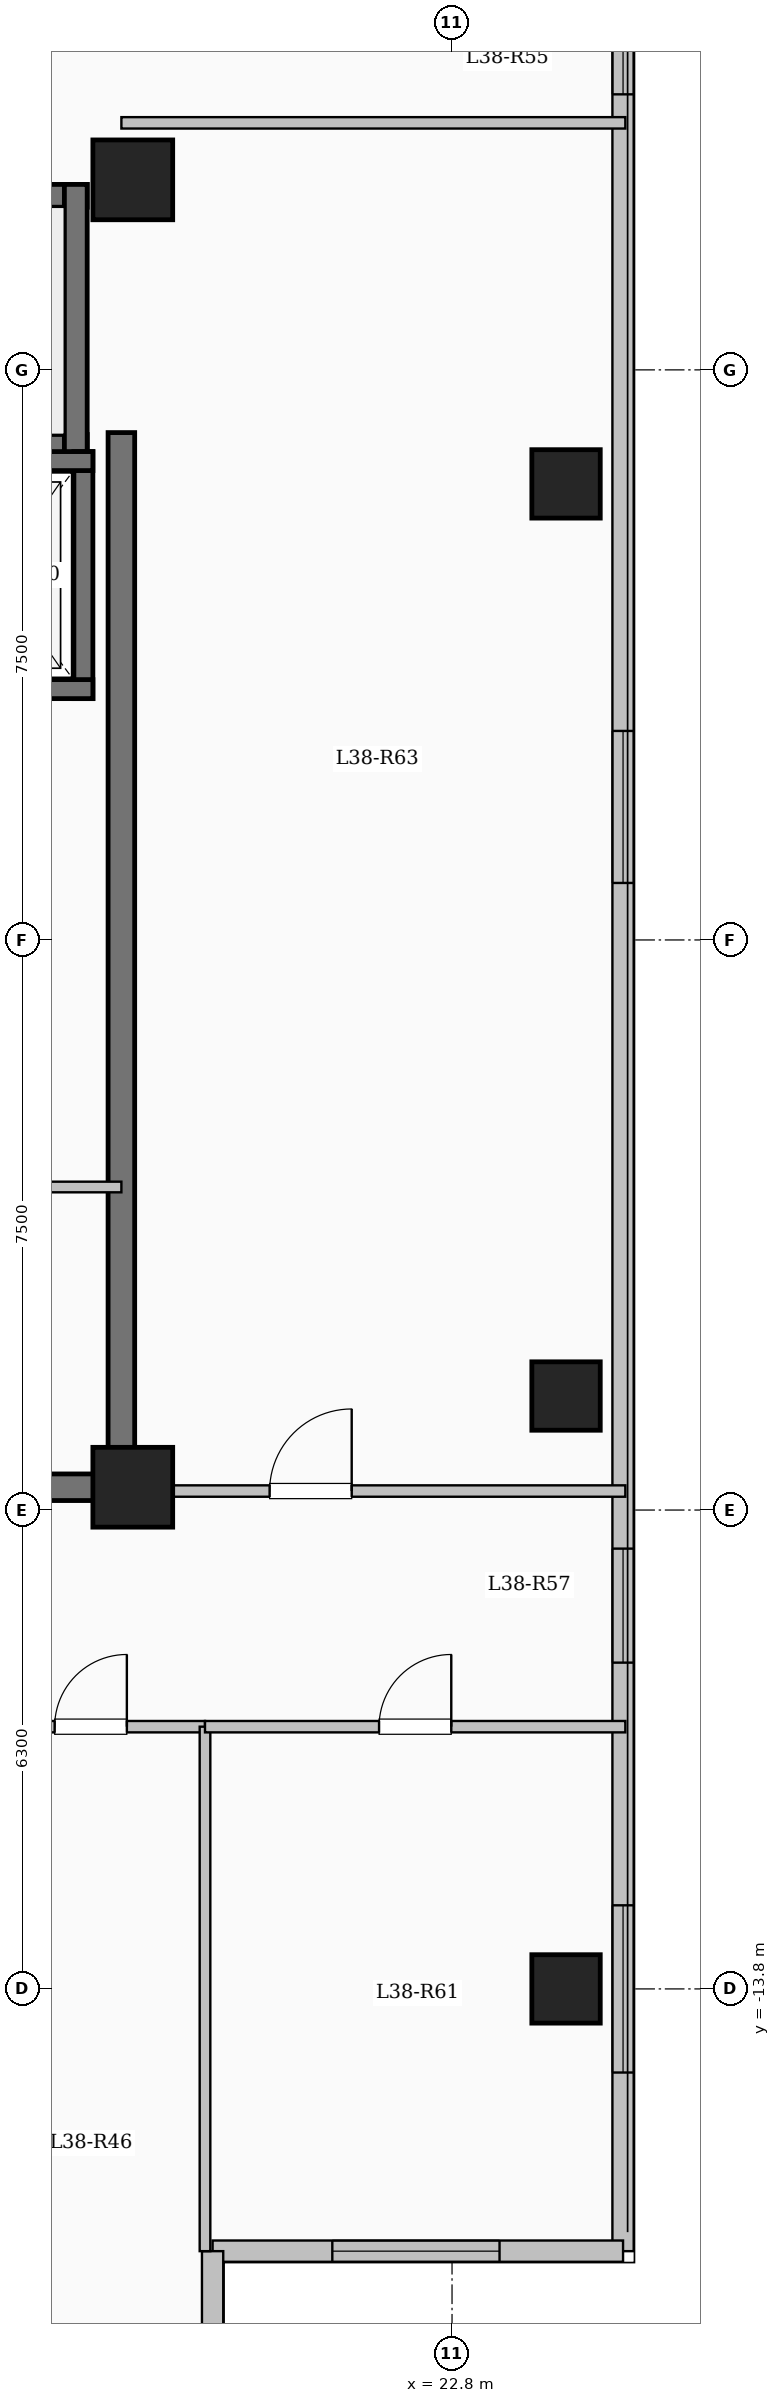
"""IFC4 building model, lengths in metres.
Left out: names, types, materials, properties, quantities, classifications, styles, units other than length and angle.
Written with IfcOpenShell. Run it as: python <this file> out.ifc"""

import sys

from ifc_helpers import new_model, si_unit, direction, frame, frame_2d, origin, origin_2d, place, context, subcontext, project, spatial, rectangle, extrude, element, fill, save


model = new_model("IFC4")
c1 = context("Model", 3, precision=1e-05, world=origin(), true_north=direction((0.0, 1.0)))
c2 = subcontext(c1, "Body", "Model", "MODEL_VIEW")
j1 = project(units=[si_unit("LENGTHUNIT", "METRE"), si_unit("PLANEANGLEUNIT", "RADIAN")], contexts=[c1])
p1 = place(None, origin())
s1 = spatial("IfcSite", under=j1, at=p1, CompositionType="ELEMENT")
p2 = place(p1, origin())
s2 = spatial("IfcBuilding", under=s1, at=p2, CompositionType="ELEMENT")
p3 = place(p2, frame((0.0, 0.0, 142.65)))
s3 = spatial("IfcBuildingStorey", under=s2, at=p3, CompositionType="ELEMENT", Elevation=142.65)
for number, where, z_axis, x_axis in (
    (1, (18.6, -7.2, 0.0), (0.0, 0.0, 1.0), (1.0, 0.0, 0.0)),
    (2, (18.6, 10.0, 0.0), (0.0, 0.0, 1.0), (1.0, 0.0, 0.0)),
):
    element("IfcColumn", number, at=place(p3, frame(where, z_axis=z_axis, x_axis=x_axis)), inside=s3, PredefinedType="COLUMN", context=c2, shape_type="SweptSolid", body=[
        extrude(rectangle(XDim=1.05, YDim=1.05, at=origin_2d()), origin(), (0.0, 0.0, 1.0), 3.35),
    ])
for number, where, z_axis, x_axis in (
    (3, (24.3, -13.8, 0.0), (0.0, 0.0, 1.0), (1.0, 0.0, 0.0)),
    (4, (24.3, -6.0, 0.0), (0.0, 0.0, 1.0), (1.0, 0.0, 0.0)),
    (5, (24.3, 6.0, 0.0), (0.0, 0.0, 1.0), (1.0, 0.0, 0.0)),
):
    element("IfcColumn", number, at=place(p3, frame(where, z_axis=z_axis, x_axis=x_axis)), inside=s3, PredefinedType="COLUMN", context=c2, shape_type="SweptSolid", body=[
        extrude(rectangle(XDim=0.9, YDim=0.9, at=origin_2d()), origin(), (0.0, 0.0, 1.0), 3.35),
    ])
p4 = place(p3, frame((25.05, 17.25, 0.0), z_axis=(0.0, 0.0, 1.0), x_axis=(0.0, -1.0, 0.0)))
e6 = element("IfcWall", 6, at=p4, inside=s3, PredefinedType="SOLIDWALL", context=c2, shape_type="SweptSolid", body=[
    extrude(rectangle(XDim=34.5, YDim=0.28, at=frame_2d((17.25, 0.0))), origin(), (0.0, 0.0, 1.0), 3.1),
])
p5 = place(p4, frame((1.375, 0.0, 0.9)))
e7 = element("IfcOpeningElement", 7, at=p5, cuts=e6, PredefinedType="OPENING", context=c2, shape_type="SweptSolid", body=[
    extrude(rectangle(XDim=2.0, YDim=1.7, at=frame_2d((1.0, 0.85))), frame((0.0, 0.15, 0.0), z_axis=(0.0, -1.0, 0.0), x_axis=(1.0, 0.0, 0.0)), (0.0, 0.0, 1.0), 0.3),
])
p6 = place(p4, frame((5.125, 0.0, 0.95)))
e8 = element("IfcOpeningElement", 8, at=p6, cuts=e6, PredefinedType="OPENING", context=c2, shape_type="SweptSolid", body=[
    extrude(rectangle(XDim=1.0, YDim=1.5, at=frame_2d((0.5, 0.75))), frame((0.0, 0.15, 0.0), z_axis=(0.0, -1.0, 0.0), x_axis=(1.0, 0.0, 0.0)), (0.0, 0.0, 1.0), 0.3),
])
p7 = place(p4, frame((14.5, 0.0, 0.9)))
e9 = element("IfcOpeningElement", 9, at=p7, cuts=e6, PredefinedType="OPENING", context=c2, shape_type="SweptSolid", body=[
    extrude(rectangle(XDim=2.0, YDim=1.7, at=frame_2d((1.0, 0.85))), frame((0.0, 0.15, 0.0), z_axis=(0.0, -1.0, 0.0), x_axis=(1.0, 0.0, 0.0)), (0.0, 0.0, 1.0), 0.3),
])
p8 = place(p4, frame((25.258, 0.0, 0.9)))
e10 = element("IfcOpeningElement", 10, at=p8, cuts=e6, PredefinedType="OPENING", context=c2, shape_type="SweptSolid", body=[
    extrude(rectangle(XDim=1.5, YDim=1.65, at=frame_2d((0.75, 0.825))), frame((0.0, 0.15, 0.0), z_axis=(0.0, -1.0, 0.0), x_axis=(1.0, 0.0, 0.0)), (0.0, 0.0, 1.0), 0.3),
])
p9 = place(p4, frame((29.95, 0.0, 0.9)))
e11 = element("IfcOpeningElement", 11, at=p9, cuts=e6, PredefinedType="OPENING", context=c2, shape_type="SweptSolid", body=[
    extrude(rectangle(XDim=2.2, YDim=1.75, at=frame_2d((1.1, 0.875))), frame((0.0, 0.15, 0.0), z_axis=(0.0, -1.0, 0.0), x_axis=(1.0, 0.0, 0.0)), (0.0, 0.0, 1.0), 0.3),
])
p10 = place(p3, frame((25.05, -17.25, 0.0), z_axis=(0.0, 0.0, 1.0), x_axis=(-1.0, 0.0, 0.0)))
e12 = element("IfcWall", 12, at=p10, inside=s3, PredefinedType="SOLIDWALL", context=c2, shape_type="SweptSolid", body=[
    extrude(rectangle(XDim=5.4, YDim=0.28, at=frame_2d((2.7, 0.0))), origin(), (0.0, 0.0, 1.0), 3.1),
])
p11 = place(p10, frame((1.625, 0.0, 0.9)))
e13 = element("IfcOpeningElement", 13, at=p11, cuts=e12, PredefinedType="OPENING", context=c2, shape_type="SweptSolid", body=[
    extrude(rectangle(XDim=2.2, YDim=1.75, at=frame_2d((1.1, 0.875))), frame((0.0, 0.15, 0.0), z_axis=(0.0, -1.0, 0.0), x_axis=(1.0, 0.0, 0.0)), (0.0, 0.0, 1.0), 0.3),
])
p12 = place(p3, frame((19.65, -17.25, 0.0), z_axis=(0.0, 0.0, 1.0), x_axis=(0.0, -1.0, 0.0)))
e14 = element("IfcWall", 14, at=p12, inside=s3, PredefinedType="SOLIDWALL", context=c2, shape_type="SweptSolid", body=[
    extrude(rectangle(XDim=3.9, YDim=0.28, at=frame_2d((1.95, 0.0))), origin(), (0.0, 0.0, 1.0), 3.1),
])
p13 = place(p12, frame((1.35, 0.0, 0.95)))
e15 = element("IfcOpeningElement", 15, at=p13, cuts=e14, PredefinedType="OPENING", context=c2, shape_type="SweptSolid", body=[
    extrude(rectangle(XDim=1.2, YDim=1.5, at=frame_2d((0.6, 0.75))), frame((0.0, 0.15, 0.0), z_axis=(0.0, -1.0, 0.0), x_axis=(1.0, 0.0, 0.0)), (0.0, 0.0, 1.0), 0.3),
])
p14 = place(p3, frame((10.0, 9.79, 0.0), z_axis=(0.0, 0.0, 1.0), x_axis=(1.0, 0.0, 0.0)))
e16 = element("IfcWall", 16, at=p14, inside=s3, PredefinedType="SHEAR", context=c2, shape_type="SweptSolid", body=[
    extrude(rectangle(XDim=8.0, YDim=0.3, at=frame_2d((4.0, 0.0))), origin(), (0.0, 0.0, 1.0), 3.35),
])
p15 = place(p3, frame((10.0, 6.5, 0.0), z_axis=(0.0, 0.0, 1.0), x_axis=(1.0, 0.0, 0.0)))
e17 = element("IfcWall", 17, at=p15, inside=s3, PredefinedType="SHEAR", context=c2, shape_type="SweptSolid", body=[
    extrude(rectangle(XDim=8.0, YDim=0.3, at=frame_2d((4.0, 0.0))), origin(), (0.0, 0.0, 1.0), 3.35),
])
p16 = place(p15, frame((0.55, 0.0, 0.0)))
e18 = element("IfcOpeningElement", 18, at=p16, cuts=e17, PredefinedType="OPENING", context=c2, shape_type="SweptSolid", body=[
    extrude(rectangle(XDim=1.0, YDim=2.15, at=frame_2d((0.5, 1.075))), frame((0.0, 0.16, 0.0), z_axis=(0.0, -1.0, 0.0), x_axis=(1.0, 0.0, 0.0)), (0.0, 0.0, 1.0), 0.32),
])
p17 = place(p3, frame((17.85, 6.35, 0.0), z_axis=(0.0, 0.0, 1.0), x_axis=(0.0, 1.0, 0.0)))
e19 = element("IfcWall", 19, at=p17, inside=s3, PredefinedType="SHEAR", context=c2, shape_type="SweptSolid", body=[
    extrude(rectangle(XDim=3.59, YDim=0.3, at=frame_2d((1.795, 0.0))), origin(), (0.0, 0.0, 1.0), 3.35),
])
p18 = place(p3, frame((17.95, 3.175, 0.0), z_axis=(0.0, 0.0, 1.0), x_axis=(0.0, 1.0, 0.0)))
e20 = element("IfcWall", 20, at=p18, inside=s3, PredefinedType="SHEAR", context=c2, shape_type="SweptSolid", body=[
    extrude(rectangle(XDim=3.25, YDim=0.25, at=frame_2d((1.625, 0.0))), origin(), (0.0, 0.0, 1.0), 3.35),
])
for number, where, z_axis, x_axis in (
    (21, (15.525, 3.3, 0.0), (0.0, 0.0, 1.0), (1.0, 0.0, 0.0)),
    (22, (15.525, 6.3, 0.0), (0.0, 0.0, 1.0), (1.0, 0.0, 0.0)),
):
    element("IfcWall", number, at=place(p3, frame(where, z_axis=z_axis, x_axis=x_axis)), inside=s3, PredefinedType="SHEAR", context=c2, shape_type="SweptSolid", body=[
        extrude(rectangle(XDim=2.55, YDim=0.25, at=frame_2d((1.275, 0.0))), origin(), (0.0, 0.0, 1.0), 3.35),
    ])
p19 = place(p3, frame((18.45, -7.375, 0.0), z_axis=(0.0, 0.0, 1.0), x_axis=(0.0, 1.0, 0.0)))
e23 = element("IfcWall", 23, at=p19, inside=s3, PredefinedType="SHEAR", context=c2, shape_type="SweptSolid", body=[
    extrude(rectangle(XDim=14.05, YDim=0.35, at=frame_2d((7.025, 0.0))), origin(), (0.0, 0.0, 1.0), 3.35),
])
p20 = place(p3, frame((10.075, -7.2, 0.0), z_axis=(0.0, 0.0, 1.0), x_axis=(1.0, 0.0, 0.0)))
e24 = element("IfcWall", 24, at=p20, inside=s3, PredefinedType="SHEAR", context=c2, shape_type="SweptSolid", body=[
    extrude(rectangle(XDim=8.55, YDim=0.35, at=frame_2d((4.275, 0.0))), origin(), (0.0, 0.0, 1.0), 3.35),
])
p21 = place(p3, frame((15.4, -3.25, 0.0), z_axis=(0.0, 0.0, 1.0), x_axis=(1.0, 0.0, 0.0)))
e25 = element("IfcWall", 25, at=p21, inside=s3, PredefinedType="PARTITIONING", context=c2, shape_type="SweptSolid", body=[
    extrude(rectangle(XDim=3.05, YDim=0.14, at=frame_2d((1.525, 0.0))), origin(), (0.0, 0.0, 1.0), 3.1),
])
p22 = place(p21, frame((1.05, 0.0, 0.0)))
e26 = element("IfcOpeningElement", 26, at=p22, cuts=e25, PredefinedType="OPENING", context=c2, shape_type="SweptSolid", body=[
    extrude(rectangle(XDim=0.9, YDim=2.08, at=frame_2d((0.45, 1.04))), frame((0.0, 0.08, 0.0), z_axis=(0.0, -1.0, 0.0), x_axis=(1.0, 0.0, 0.0)), (0.0, 0.0, 1.0), 0.16),
])
p23 = place(p3, frame((8.55, -10.35, 0.0), z_axis=(0.0, 0.0, 1.0), x_axis=(1.0, 0.0, 0.0)))
e27 = element("IfcWall", 27, at=p23, inside=s3, PredefinedType="PARTITIONING", context=c2, shape_type="SweptSolid", body=[
    extrude(rectangle(XDim=11.0, YDim=0.15, at=frame_2d((5.5, 0.0))), origin(), (0.0, 0.0, 1.0), 3.1),
])
p24 = place(p23, frame((1.516, 0.0, 0.0)))
e28 = element("IfcOpeningElement", 28, at=p24, cuts=e27, PredefinedType="OPENING", context=c2, shape_type="SweptSolid", body=[
    extrude(rectangle(XDim=0.95, YDim=2.15, at=frame_2d((0.475, 1.075))), frame((0.0, 0.085, 0.0), z_axis=(0.0, -1.0, 0.0), x_axis=(1.0, 0.0, 0.0)), (0.0, 0.0, 1.0), 0.17),
])
p25 = place(p23, frame((5.488, 0.0, 0.0)))
e29 = element("IfcOpeningElement", 29, at=p25, cuts=e27, PredefinedType="OPENING", context=c2, shape_type="SweptSolid", body=[
    extrude(rectangle(XDim=0.95, YDim=2.15, at=frame_2d((0.475, 1.075))), frame((0.0, 0.085, 0.0), z_axis=(0.0, -1.0, 0.0), x_axis=(1.0, 0.0, 0.0)), (0.0, 0.0, 1.0), 0.17),
])
p26 = place(p23, frame((9.022, 0.0, 0.0)))
e30 = element("IfcOpeningElement", 30, at=p26, cuts=e27, PredefinedType="OPENING", context=c2, shape_type="SweptSolid", body=[
    extrude(rectangle(XDim=0.95, YDim=2.15, at=frame_2d((0.475, 1.075))), frame((0.0, 0.085, 0.0), z_axis=(0.0, -1.0, 0.0), x_axis=(1.0, 0.0, 0.0)), (0.0, 0.0, 1.0), 0.17),
])
p27 = place(p3, frame((18.45, -7.25, 0.0), z_axis=(0.0, 0.0, 1.0), x_axis=(1.0, 0.0, 0.0)))
e31 = element("IfcWall", 31, at=p27, inside=s3, PredefinedType="PARTITIONING", context=c2, shape_type="SweptSolid", body=[
    extrude(rectangle(XDim=6.63, YDim=0.15, at=frame_2d((3.315, 0.0))), origin(), (0.0, 0.0, 1.0), 3.1),
])
p28 = place(p27, frame((1.95, 0.0, 0.0)))
e32 = element("IfcOpeningElement", 32, at=p28, cuts=e31, PredefinedType="OPENING", context=c2, shape_type="SweptSolid", body=[
    extrude(rectangle(XDim=1.08, YDim=2.15, at=frame_2d((0.54, 1.075))), frame((0.0, 0.085, 0.0), z_axis=(0.0, -1.0, 0.0), x_axis=(1.0, 0.0, 0.0)), (0.0, 0.0, 1.0), 0.17),
])
p29 = place(p3, frame((18.45, 10.75, 0.0), z_axis=(0.0, 0.0, 1.0), x_axis=(1.0, 0.0, 0.0)))
e33 = element("IfcWall", 33, at=p29, inside=s3, PredefinedType="PARTITIONING", context=c2, shape_type="SweptSolid", body=[
    extrude(rectangle(XDim=6.63, YDim=0.15, at=frame_2d((3.315, 0.0))), origin(), (0.0, 0.0, 1.0), 3.1),
])
p30 = place(p3, frame((19.55, -17.25, 0.0), z_axis=(0.0, 0.0, 1.0), x_axis=(0.0, 1.0, 0.0)))
e34 = element("IfcWall", 34, at=p30, inside=s3, PredefinedType="PARTITIONING", context=c2, shape_type="SweptSolid", body=[
    extrude(rectangle(XDim=6.9, YDim=0.14, at=frame_2d((3.45, 0.0))), origin(), (0.0, 0.0, 1.0), 3.1),
])
p31 = place(p3, frame((19.55, -10.35, 0.0), z_axis=(0.0, 0.0, 1.0), x_axis=(1.0, 0.0, 0.0)))
e35 = element("IfcWall", 35, at=p31, inside=s3, PredefinedType="PARTITIONING", context=c2, shape_type="SweptSolid", body=[
    extrude(rectangle(XDim=5.53, YDim=0.15, at=frame_2d((2.765, 0.0))), origin(), (0.0, 0.0, 1.0), 3.1),
])
p32 = place(p31, frame((2.29, 0.0, 0.0)))
e36 = element("IfcOpeningElement", 36, at=p32, cuts=e35, PredefinedType="OPENING", context=c2, shape_type="SweptSolid", body=[
    extrude(rectangle(XDim=0.95, YDim=2.15, at=frame_2d((0.475, 1.075))), frame((0.0, 0.085, 0.0), z_axis=(0.0, -1.0, 0.0), x_axis=(1.0, 0.0, 0.0)), (0.0, 0.0, 1.0), 0.17),
])
p33 = place(p6, origin())
e37 = element("IfcWindow", 37, at=p33, inside=s3, PartitioningType="SINGLE_PANEL", PredefinedType="WINDOW", context=c2, shape_type="SweptSolid", body=[
    extrude(rectangle(XDim=1.0, YDim=1.5, at=frame_2d((0.5, 0.75))), frame((0.0, 0.03, 0.0), z_axis=(0.0, -1.0, 0.0), x_axis=(1.0, 0.0, 0.0)), (0.0, 0.0, 1.0), 0.06),
])
fill(e8, e37)
p34 = place(p7, origin())
e38 = element("IfcWindow", 38, at=p34, inside=s3, PartitioningType="SINGLE_PANEL", PredefinedType="WINDOW", context=c2, shape_type="SweptSolid", body=[
    extrude(rectangle(XDim=2.0, YDim=1.7, at=frame_2d((1.0, 0.85))), frame((0.0, 0.03, 0.0), z_axis=(0.0, -1.0, 0.0), x_axis=(1.0, 0.0, 0.0)), (0.0, 0.0, 1.0), 0.06),
])
fill(e9, e38)
p35 = place(p8, origin())
e39 = element("IfcWindow", 39, at=p35, inside=s3, PartitioningType="SINGLE_PANEL", PredefinedType="WINDOW", context=c2, shape_type="SweptSolid", body=[
    extrude(rectangle(XDim=1.5, YDim=1.65, at=frame_2d((0.75, 0.825))), frame((0.0, 0.03, 0.0), z_axis=(0.0, -1.0, 0.0), x_axis=(1.0, 0.0, 0.0)), (0.0, 0.0, 1.0), 0.06),
])
fill(e10, e39)
p36 = place(p9, origin())
e40 = element("IfcWindow", 40, at=p36, inside=s3, PartitioningType="SINGLE_PANEL", PredefinedType="WINDOW", context=c2, shape_type="SweptSolid", body=[
    extrude(rectangle(XDim=2.2, YDim=1.75, at=frame_2d((1.1, 0.875))), frame((0.0, 0.03, 0.0), z_axis=(0.0, -1.0, 0.0), x_axis=(1.0, 0.0, 0.0)), (0.0, 0.0, 1.0), 0.06),
])
fill(e11, e40)
p37 = place(p11, origin())
e41 = element("IfcWindow", 41, at=p37, inside=s3, PartitioningType="SINGLE_PANEL", PredefinedType="WINDOW", context=c2, shape_type="SweptSolid", body=[
    extrude(rectangle(XDim=2.2, YDim=1.75, at=frame_2d((1.1, 0.875))), frame((0.0, 0.03, 0.0), z_axis=(0.0, -1.0, 0.0), x_axis=(1.0, 0.0, 0.0)), (0.0, 0.0, 1.0), 0.06),
])
fill(e13, e41)
p38 = place(p26, origin())
e42 = element("IfcDoor", 42, at=p38, inside=s3, OperationType="SINGLE_SWING_RIGHT", PredefinedType="DOOR", context=c2, shape_type="SweptSolid", body=[
    extrude(rectangle(XDim=0.95, YDim=2.15, at=frame_2d((0.475, 1.075))), frame((0.0, 0.025, 0.0), z_axis=(0.0, -1.0, 0.0), x_axis=(1.0, 0.0, 0.0)), (0.0, 0.0, 1.0), 0.05),
])
fill(e30, e42)
p39 = place(p32, origin())
e43 = element("IfcDoor", 43, at=p39, inside=s3, OperationType="SINGLE_SWING_RIGHT", PredefinedType="DOOR", context=c2, shape_type="SweptSolid", body=[
    extrude(rectangle(XDim=0.95, YDim=2.15, at=frame_2d((0.475, 1.075))), frame((0.0, 0.025, 0.0), z_axis=(0.0, -1.0, 0.0), x_axis=(1.0, 0.0, 0.0)), (0.0, 0.0, 1.0), 0.05),
])
fill(e36, e43)
p40 = place(p28, origin())
e44 = element("IfcDoor", 44, at=p40, inside=s3, OperationType="SINGLE_SWING_RIGHT", PredefinedType="DOOR", context=c2, shape_type="SweptSolid", body=[
    extrude(rectangle(XDim=1.08, YDim=2.15, at=frame_2d((0.54, 1.075))), frame((0.0, 0.025, 0.0), z_axis=(0.0, -1.0, 0.0), x_axis=(1.0, 0.0, 0.0)), (0.0, 0.0, 1.0), 0.05),
])
fill(e32, e44)
save(model, sys.argv[1])
